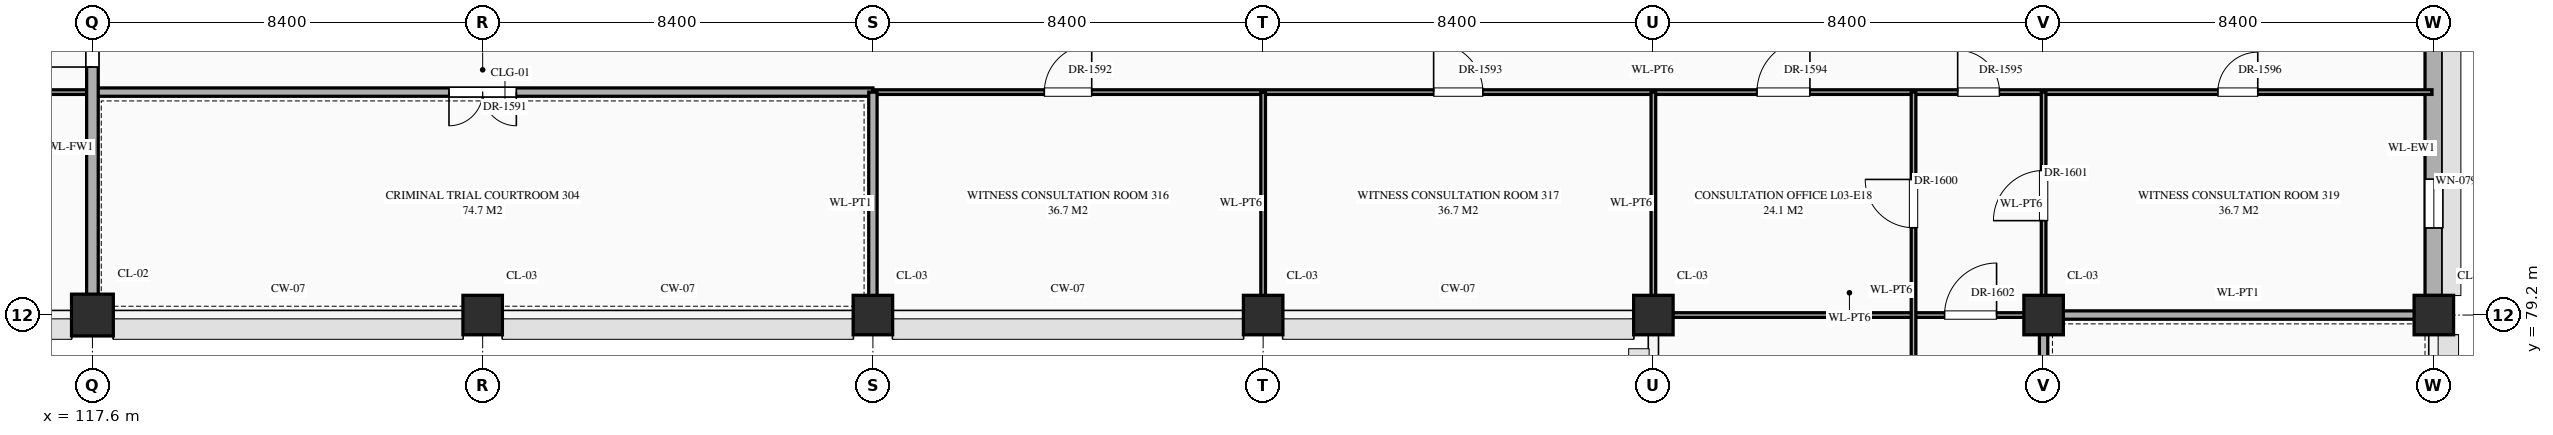
"""IFC4 building model, lengths in metres.
Left out: names, types, materials, properties, quantities, classifications, styles, units other than length and angle.
Written with IfcOpenShell. Run it as: python <this file> out.ifc"""

import sys

from ifc_helpers import new_model, si_unit, direction, frame, frame_2d, origin, origin_2d, place, context, subcontext, project, spatial, rectangle, extrude, element, fill, save


model = new_model("IFC4")
c1 = context("Model", 3, precision=1e-05, world=origin(), true_north=direction((0.0, 1.0)))
c2 = subcontext(c1, "Body", "Model", "MODEL_VIEW")
j1 = project(units=[si_unit("LENGTHUNIT", "METRE"), si_unit("PLANEANGLEUNIT", "RADIAN")], contexts=[c1])
p1 = place(None, origin())
s1 = spatial("IfcSite", under=j1, at=p1, CompositionType="ELEMENT")
p2 = place(p1, origin())
s2 = spatial("IfcBuilding", under=s1, at=p2, CompositionType="ELEMENT")
p3 = place(p2, frame((0.0, 0.0, 10.8)))
s3 = spatial("IfcBuildingStorey", under=s2, at=p3, CompositionType="ELEMENT", Elevation=10.8)
p4 = place(p3, frame((117.6, 79.2, 0.0), z_axis=(0.0, 0.0, 1.0), x_axis=(1.0, 0.0, 0.0)))
e1 = element("IfcColumn", 1, at=p4, inside=s3, PredefinedType="COLUMN", context=c2, shape_type="SweptSolid", body=[
    extrude(rectangle(XDim=0.9, YDim=0.9, at=origin_2d()), origin(), (0.0, 0.0, 1.0), 5.4),
])
for number, where, z_axis, x_axis in (
    (2, (126.0, 79.2, 0.0), (0.0, 0.0, 1.0), (1.0, 0.0, 0.0)),
    (3, (134.4, 79.2, 0.0), (0.0, 0.0, 1.0), (1.0, 0.0, 0.0)),
    (4, (142.8, 79.2, 0.0), (0.0, 0.0, 1.0), (1.0, 0.0, 0.0)),
    (5, (151.2, 79.2, 0.0), (0.0, 0.0, 1.0), (1.0, 0.0, 0.0)),
    (6, (159.6, 79.2, 0.0), (0.0, 0.0, 1.0), (1.0, 0.0, 0.0)),
    (7, (168.0, 79.2, 0.0), (0.0, 0.0, 1.0), (1.0, 0.0, 0.0)),
):
    element("IfcColumn", number, at=place(p3, frame(where, z_axis=z_axis, x_axis=x_axis)), inside=s3, PredefinedType="COLUMN", context=c2, shape_type="SweptSolid", body=[
        extrude(rectangle(XDim=0.85, YDim=0.85, at=origin_2d()), origin(), (0.0, 0.0, 1.0), 5.4),
    ])
p5 = place(p3, frame((168.0, 79.62, 0.0), z_axis=(0.0, 0.0, 1.0), x_axis=(0.0, 1.0, 0.0)))
e8 = element("IfcWall", 8, at=p5, inside=s3, PredefinedType="STANDARD", context=c2, shape_type="SweptSolid", body=[
    extrude(rectangle(XDim=6.36, YDim=0.38, at=frame_2d((3.18, 0.0))), origin(), (0.0, 0.0, 1.0), 4.47),
])
p6 = place(p5, frame((1.455, 0.0, 0.85)))
e9 = element("IfcOpeningElement", 9, at=p6, cuts=e8, PredefinedType="OPENING", context=c2, shape_type="SweptSolid", body=[
    extrude(rectangle(XDim=1.05, YDim=1.92, at=frame_2d((0.525, 0.96))), frame((0.0, 0.202, 0.0), z_axis=(0.0, -1.0, 0.0), x_axis=(1.0, 0.0, 0.0)), (0.0, 0.0, 1.0), 0.404),
])
p7 = place(p3, frame((151.24, 79.2, 0.0), z_axis=(0.0, 0.0, 1.0), x_axis=(1.0, 0.0, 0.0)))
e10 = element("IfcWall", 10, at=p7, inside=s3, PredefinedType="STANDARD", context=c2, shape_type="SweptSolid", body=[
    extrude(rectangle(XDim=8.36, YDim=0.1, at=frame_2d((4.18, 0.0))), origin(), (0.0, 0.0, 1.0), 4.27),
])
p8 = place(p7, frame((6.228, 0.0, 0.0)))
e11 = element("IfcOpeningElement", 11, at=p8, cuts=e10, PredefinedType="OPENING", context=c2, shape_type="SweptSolid", body=[
    extrude(rectangle(XDim=1.12, YDim=2.25, at=frame_2d((0.56, 1.125))), frame((0.0, 0.062, 0.0), z_axis=(0.0, -1.0, 0.0), x_axis=(1.0, 0.0, 0.0)), (0.0, 0.0, 1.0), 0.124),
])
p9 = place(p3, frame((159.6, 79.2, 0.0), z_axis=(0.0, 0.0, 1.0), x_axis=(1.0, 0.0, 0.0)))
e12 = element("IfcWall", 12, at=p9, inside=s3, PredefinedType="STANDARD", context=c2, shape_type="SweptSolid", body=[
    extrude(rectangle(XDim=8.36, YDim=0.18, at=frame_2d((4.18, 0.0))), origin(), (0.0, 0.0, 1.0), 4.27),
])
p10 = place(p3, frame((50.4, 84.0, 0.0), z_axis=(0.0, 0.0, 1.0), x_axis=(1.0, 0.0, 0.0)))
e13 = element("IfcWall", 13, at=p10, inside=s3, PredefinedType="STANDARD", context=c2, shape_type="SweptSolid", body=[
    extrude(rectangle(XDim=67.2, YDim=0.1, at=frame_2d((33.6, 0.0))), origin(), (0.0, 0.0, 1.0), 5.12),
])
p11 = place(p10, frame((3.7, 0.0, 0.0)))
e14 = element("IfcOpeningElement", 14, at=p11, cuts=e13, PredefinedType="OPENING", context=c2, shape_type="SweptSolid", body=[
    extrude(rectangle(XDim=1.0, YDim=2.25, at=frame_2d((0.5, 1.125))), frame((0.0, 0.062, 0.0), z_axis=(0.0, -1.0, 0.0), x_axis=(1.0, 0.0, 0.0)), (0.0, 0.0, 1.0), 0.124),
])
p12 = place(p10, frame((12.08, 0.0, 0.0)))
e15 = element("IfcOpeningElement", 15, at=p12, cuts=e13, PredefinedType="OPENING", context=c2, shape_type="SweptSolid", body=[
    extrude(rectangle(XDim=1.04, YDim=2.2, at=frame_2d((0.52, 1.1))), frame((0.0, 0.062, 0.0), z_axis=(0.0, -1.0, 0.0), x_axis=(1.0, 0.0, 0.0)), (0.0, 0.0, 1.0), 0.124),
])
p13 = place(p10, frame((20.46, 0.0, 0.0)))
e16 = element("IfcOpeningElement", 16, at=p13, cuts=e13, PredefinedType="OPENING", context=c2, shape_type="SweptSolid", body=[
    extrude(rectangle(XDim=1.08, YDim=2.25, at=frame_2d((0.54, 1.125))), frame((0.0, 0.062, 0.0), z_axis=(0.0, -1.0, 0.0), x_axis=(1.0, 0.0, 0.0)), (0.0, 0.0, 1.0), 0.124),
])
p14 = place(p10, frame((28.84, 0.0, 0.0)))
e17 = element("IfcOpeningElement", 17, at=p14, cuts=e13, PredefinedType="OPENING", context=c2, shape_type="SweptSolid", body=[
    extrude(rectangle(XDim=1.12, YDim=2.25, at=frame_2d((0.56, 1.125))), frame((0.0, 0.062, 0.0), z_axis=(0.0, -1.0, 0.0), x_axis=(1.0, 0.0, 0.0)), (0.0, 0.0, 1.0), 0.124),
])
p15 = place(p10, frame((37.2, 0.0, 0.0)))
e18 = element("IfcOpeningElement", 18, at=p15, cuts=e13, PredefinedType="OPENING", context=c2, shape_type="SweptSolid", body=[
    extrude(rectangle(XDim=1.2, YDim=2.35, at=frame_2d((0.6, 1.175))), frame((0.0, 0.062, 0.0), z_axis=(0.0, -1.0, 0.0), x_axis=(1.0, 0.0, 0.0)), (0.0, 0.0, 1.0), 0.124),
])
p16 = place(p10, frame((45.58, 0.0, 0.0)))
e19 = element("IfcOpeningElement", 19, at=p16, cuts=e13, PredefinedType="OPENING", context=c2, shape_type="SweptSolid", body=[
    extrude(rectangle(XDim=1.24, YDim=2.3, at=frame_2d((0.62, 1.15))), frame((0.0, 0.062, 0.0), z_axis=(0.0, -1.0, 0.0), x_axis=(1.0, 0.0, 0.0)), (0.0, 0.0, 1.0), 0.124),
])
p17 = place(p10, frame((53.96, 0.0, 0.0)))
e20 = element("IfcOpeningElement", 20, at=p17, cuts=e13, PredefinedType="OPENING", context=c2, shape_type="SweptSolid", body=[
    extrude(rectangle(XDim=1.28, YDim=2.35, at=frame_2d((0.64, 1.175))), frame((0.0, 0.062, 0.0), z_axis=(0.0, -1.0, 0.0), x_axis=(1.0, 0.0, 0.0)), (0.0, 0.0, 1.0), 0.124),
])
p18 = place(p10, frame((62.53, 0.0, 0.0)))
e21 = element("IfcOpeningElement", 21, at=p18, cuts=e13, PredefinedType="OPENING", context=c2, shape_type="SweptSolid", body=[
    extrude(rectangle(XDim=0.94, YDim=2.3, at=frame_2d((0.47, 1.15))), frame((0.0, 0.062, 0.0), z_axis=(0.0, -1.0, 0.0), x_axis=(1.0, 0.0, 0.0)), (0.0, 0.0, 1.0), 0.124),
])
p19 = place(p3, frame((117.6, 84.0, 0.0), z_axis=(0.0, 0.0, 1.0), x_axis=(1.0, 0.0, 0.0)))
e22 = element("IfcWall", 22, at=p19, inside=s3, PredefinedType="STANDARD", context=c2, shape_type="SweptSolid", body=[
    extrude(rectangle(XDim=16.8, YDim=0.18, at=frame_2d((8.4, 0.0))), origin(), (0.0, 0.0, 1.0), 5.12),
])
p20 = place(p19, frame((7.675, 0.0, 0.0)))
e23 = element("IfcOpeningElement", 23, at=p20, cuts=e22, PredefinedType="OPENING", context=c2, shape_type="SweptSolid", body=[
    extrude(rectangle(XDim=1.45, YDim=2.3, at=frame_2d((0.725, 1.15))), frame((0.0, 0.102, 0.0), z_axis=(0.0, -1.0, 0.0), x_axis=(1.0, 0.0, 0.0)), (0.0, 0.0, 1.0), 0.204),
])
p21 = place(p3, frame((134.4, 84.0, 0.0), z_axis=(0.0, 0.0, 1.0), x_axis=(1.0, 0.0, 0.0)))
e24 = element("IfcWall", 24, at=p21, inside=s3, PredefinedType="STANDARD", context=c2, shape_type="SweptSolid", body=[
    extrude(rectangle(XDim=33.56, YDim=0.1, at=frame_2d((16.78, 0.0))), origin(), (0.0, 0.0, 1.0), 5.12),
])
p22 = place(p21, frame((3.69, 0.0, 0.0)))
e25 = element("IfcOpeningElement", 25, at=p22, cuts=e24, PredefinedType="OPENING", context=c2, shape_type="SweptSolid", body=[
    extrude(rectangle(XDim=1.02, YDim=2.4, at=frame_2d((0.51, 1.2))), frame((0.0, 0.062, 0.0), z_axis=(0.0, -1.0, 0.0), x_axis=(1.0, 0.0, 0.0)), (0.0, 0.0, 1.0), 0.124),
])
p23 = place(p21, frame((12.07, 0.0, 0.0)))
e26 = element("IfcOpeningElement", 26, at=p23, cuts=e24, PredefinedType="OPENING", context=c2, shape_type="SweptSolid", body=[
    extrude(rectangle(XDim=1.06, YDim=2.4, at=frame_2d((0.53, 1.2))), frame((0.0, 0.062, 0.0), z_axis=(0.0, -1.0, 0.0), x_axis=(1.0, 0.0, 0.0)), (0.0, 0.0, 1.0), 0.124),
])
p24 = place(p21, frame((19.03, 0.0, 0.0)))
e27 = element("IfcOpeningElement", 27, at=p24, cuts=e24, PredefinedType="OPENING", context=c2, shape_type="SweptSolid", body=[
    extrude(rectangle(XDim=1.14, YDim=2.4, at=frame_2d((0.57, 1.2))), frame((0.0, 0.062, 0.0), z_axis=(0.0, -1.0, 0.0), x_axis=(1.0, 0.0, 0.0)), (0.0, 0.0, 1.0), 0.124),
])
p25 = place(p21, frame((23.35, 0.0, 0.0)))
e28 = element("IfcOpeningElement", 28, at=p25, cuts=e24, PredefinedType="OPENING", context=c2, shape_type="SweptSolid", body=[
    extrude(rectangle(XDim=0.9, YDim=2.15, at=frame_2d((0.45, 1.075))), frame((0.0, 0.062, 0.0), z_axis=(0.0, -1.0, 0.0), x_axis=(1.0, 0.0, 0.0)), (0.0, 0.0, 1.0), 0.124),
])
p26 = place(p21, frame((28.95, 0.0, 0.0)))
e29 = element("IfcOpeningElement", 29, at=p26, cuts=e24, PredefinedType="OPENING", context=c2, shape_type="SweptSolid", body=[
    extrude(rectangle(XDim=0.86, YDim=2.1, at=frame_2d((0.43, 1.05))), frame((0.0, 0.062, 0.0), z_axis=(0.0, -1.0, 0.0), x_axis=(1.0, 0.0, 0.0)), (0.0, 0.0, 1.0), 0.124),
])
p27 = place(p3, frame((117.6, 79.24, 0.0), z_axis=(0.0, 0.0, 1.0), x_axis=(0.0, 1.0, 0.0)))
e30 = element("IfcWall", 30, at=p27, inside=s3, PredefinedType="STANDARD", context=c2, shape_type="SweptSolid", body=[
    extrude(rectangle(XDim=7.16, YDim=0.25, at=frame_2d((3.58, 0.0))), origin(), (0.0, 0.0, 1.0), 4.37),
])
p28 = place(p27, frame((5.3, 0.0, 0.0)))
e31 = element("IfcOpeningElement", 31, at=p28, cuts=e30, PredefinedType="OPENING", context=c2, shape_type="SweptSolid", body=[
    extrude(rectangle(XDim=0.95, YDim=2.15, at=frame_2d((0.475, 1.075))), frame((0.0, 0.137, 0.0), z_axis=(0.0, -1.0, 0.0), x_axis=(1.0, 0.0, 0.0)), (0.0, 0.0, 1.0), 0.274),
])
p29 = place(p3, frame((134.4, 79.24, 0.0), z_axis=(0.0, 0.0, 1.0), x_axis=(0.0, 1.0, 0.0)))
e32 = element("IfcWall", 32, at=p29, inside=s3, PredefinedType="STANDARD", context=c2, shape_type="SweptSolid", body=[
    extrude(rectangle(XDim=4.76, YDim=0.18, at=frame_2d((2.38, 0.0))), origin(), (0.0, 0.0, 1.0), 4.37),
])
for number, where, z_axis, x_axis in (
    (33, (142.8, 79.24, 0.0), (0.0, 0.0, 1.0), (0.0, 1.0, 0.0)),
    (34, (151.2, 79.24, 0.0), (0.0, 0.0, 1.0), (0.0, 1.0, 0.0)),
):
    element("IfcWall", number, at=place(p3, frame(where, z_axis=z_axis, x_axis=x_axis)), inside=s3, PredefinedType="STANDARD", context=c2, shape_type="SweptSolid", body=[
        extrude(rectangle(XDim=4.76, YDim=0.1, at=frame_2d((2.38, 0.0))), origin(), (0.0, 0.0, 1.0), 4.37),
    ])
p30 = place(p3, frame((156.8, 64.8, 0.0), z_axis=(0.0, 0.0, 1.0), x_axis=(0.0, 1.0, 0.0)))
e35 = element("IfcWall", 35, at=p30, inside=s3, PredefinedType="STANDARD", context=c2, shape_type="SweptSolid", body=[
    extrude(rectangle(XDim=19.2, YDim=0.1, at=frame_2d((9.6, 0.0))), origin(), (0.0, 0.0, 1.0), 5.12),
])
p31 = place(p30, frame((16.28, 0.0, 0.0)))
e36 = element("IfcOpeningElement", 36, at=p31, cuts=e35, PredefinedType="OPENING", context=c2, shape_type="SweptSolid", body=[
    extrude(rectangle(XDim=1.04, YDim=2.2, at=frame_2d((0.52, 1.1))), frame((0.0, 0.062, 0.0), z_axis=(0.0, -1.0, 0.0), x_axis=(1.0, 0.0, 0.0)), (0.0, 0.0, 1.0), 0.124),
])
p32 = place(p30, frame((0.68, 0.0, 0.0)))
e37 = element("IfcOpeningElement", 37, at=p32, cuts=e35, PredefinedType="OPENING", context=c2, shape_type="SweptSolid", body=[
    extrude(rectangle(XDim=1.04, YDim=2.2, at=frame_2d((0.52, 1.1))), frame((0.0, 0.062, 0.0), z_axis=(0.0, -1.0, 0.0), x_axis=(1.0, 0.0, 0.0)), (0.0, 0.0, 1.0), 0.124),
])
p33 = place(p30, frame((4.26, 0.0, 0.0)))
e38 = element("IfcOpeningElement", 38, at=p33, cuts=e35, PredefinedType="OPENING", context=c2, shape_type="SweptSolid", body=[
    extrude(rectangle(XDim=1.08, YDim=2.25, at=frame_2d((0.54, 1.125))), frame((0.0, 0.062, 0.0), z_axis=(0.0, -1.0, 0.0), x_axis=(1.0, 0.0, 0.0)), (0.0, 0.0, 1.0), 0.124),
])
p34 = place(p30, frame((10.24, 0.0, 0.0)))
e39 = element("IfcOpeningElement", 39, at=p34, cuts=e35, PredefinedType="OPENING", context=c2, shape_type="SweptSolid", body=[
    extrude(rectangle(XDim=1.12, YDim=2.25, at=frame_2d((0.56, 1.125))), frame((0.0, 0.062, 0.0), z_axis=(0.0, -1.0, 0.0), x_axis=(1.0, 0.0, 0.0)), (0.0, 0.0, 1.0), 0.124),
])
p35 = place(p3, frame((159.6, 64.8, 0.0), z_axis=(0.0, 0.0, 1.0), x_axis=(0.0, 1.0, 0.0)))
e40 = element("IfcWall", 40, at=p35, inside=s3, PredefinedType="STANDARD", context=c2, shape_type="SweptSolid", body=[
    extrude(rectangle(XDim=14.4, YDim=0.18, at=frame_2d((7.2, 0.0))), origin(), (0.0, 0.0, 1.0), 5.12),
])
p36 = place(p35, frame((6.177, 0.0, 0.0)))
e41 = element("IfcOpeningElement", 41, at=p36, cuts=e40, PredefinedType="OPENING", context=c2, shape_type="SweptSolid", body=[
    extrude(rectangle(XDim=1.7, YDim=2.45, at=frame_2d((0.85, 1.225))), frame((0.0, 0.102, 0.0), z_axis=(0.0, -1.0, 0.0), x_axis=(1.0, 0.0, 0.0)), (0.0, 0.0, 1.0), 0.204),
])
p37 = place(p3, frame((159.6, 79.2, 0.0), z_axis=(0.0, 0.0, 1.0), x_axis=(0.0, 1.0, 0.0)))
e42 = element("IfcWall", 42, at=p37, inside=s3, PredefinedType="STANDARD", context=c2, shape_type="SweptSolid", body=[
    extrude(rectangle(XDim=4.8, YDim=0.1, at=frame_2d((2.4, 0.0))), origin(), (0.0, 0.0, 1.0), 4.37),
])
p38 = place(p37, frame((2.032, 0.0, 0.0)))
e43 = element("IfcOpeningElement", 43, at=p38, cuts=e42, PredefinedType="OPENING", context=c2, shape_type="SweptSolid", body=[
    extrude(rectangle(XDim=1.08, YDim=2.25, at=frame_2d((0.54, 1.125))), frame((0.0, 0.062, 0.0), z_axis=(0.0, -1.0, 0.0), x_axis=(1.0, 0.0, 0.0)), (0.0, 0.0, 1.0), 0.124),
])
p39 = place(p6, origin())
e44 = element("IfcWindow", 44, at=p39, inside=s3, PartitioningType="SINGLE_PANEL", PredefinedType="WINDOW", context=c2, shape_type="SweptSolid", body=[
    extrude(rectangle(XDim=1.05, YDim=1.92, at=frame_2d((0.525, 0.96))), frame((0.0, 0.03, 0.0), z_axis=(0.0, -1.0, 0.0), x_axis=(1.0, 0.0, 0.0)), (0.0, 0.0, 1.0), 0.06),
])
fill(e9, e44)
p40 = place(p28, origin())
e45 = element("IfcDoor", 45, at=p40, inside=s3, OperationType="SINGLE_SWING_LEFT", PredefinedType="DOOR", context=c2, shape_type="SweptSolid", body=[
    extrude(rectangle(XDim=0.95, YDim=2.15, at=frame_2d((0.475, 1.075))), frame((0.0, 0.025, 0.0), z_axis=(0.0, -1.0, 0.0), x_axis=(1.0, 0.0, 0.0)), (0.0, 0.0, 1.0), 0.05),
])
fill(e31, e45)
p41 = place(p20, frame((1.45, 0.0, 0.0), z_axis=(0.0, 0.0, 1.0), x_axis=(-1.0, 0.0, 0.0)))
e46 = element("IfcDoor", 46, at=p41, inside=s3, OperationType="DOUBLE_DOOR_SINGLE_SWING", PredefinedType="DOOR", context=c2, shape_type="SweptSolid", body=[
    extrude(rectangle(XDim=1.45, YDim=2.3, at=frame_2d((0.725, 1.15))), frame((0.0, 0.025, 0.0), z_axis=(0.0, -1.0, 0.0), x_axis=(1.0, 0.0, 0.0)), (0.0, 0.0, 1.0), 0.05),
])
fill(e23, e46)
p42 = place(p22, origin())
e47 = element("IfcDoor", 47, at=p42, inside=s3, OperationType="SINGLE_SWING_RIGHT", PredefinedType="DOOR", context=c2, shape_type="SweptSolid", body=[
    extrude(rectangle(XDim=1.02, YDim=2.4, at=frame_2d((0.51, 1.2))), frame((0.0, 0.025, 0.0), z_axis=(0.0, -1.0, 0.0), x_axis=(1.0, 0.0, 0.0)), (0.0, 0.0, 1.0), 0.05),
])
fill(e25, e47)
p43 = place(p23, origin())
e48 = element("IfcDoor", 48, at=p43, inside=s3, OperationType="SINGLE_SWING_LEFT", PredefinedType="DOOR", context=c2, shape_type="SweptSolid", body=[
    extrude(rectangle(XDim=1.06, YDim=2.4, at=frame_2d((0.53, 1.2))), frame((0.0, 0.025, 0.0), z_axis=(0.0, -1.0, 0.0), x_axis=(1.0, 0.0, 0.0)), (0.0, 0.0, 1.0), 0.05),
])
fill(e26, e48)
p44 = place(p24, origin())
e49 = element("IfcDoor", 49, at=p44, inside=s3, OperationType="SINGLE_SWING_RIGHT", PredefinedType="DOOR", context=c2, shape_type="SweptSolid", body=[
    extrude(rectangle(XDim=1.14, YDim=2.4, at=frame_2d((0.57, 1.2))), frame((0.0, 0.025, 0.0), z_axis=(0.0, -1.0, 0.0), x_axis=(1.0, 0.0, 0.0)), (0.0, 0.0, 1.0), 0.05),
])
fill(e27, e49)
p45 = place(p25, origin())
e50 = element("IfcDoor", 50, at=p45, inside=s3, OperationType="SINGLE_SWING_LEFT", PredefinedType="DOOR", context=c2, shape_type="SweptSolid", body=[
    extrude(rectangle(XDim=0.9, YDim=2.15, at=frame_2d((0.45, 1.075))), frame((0.0, 0.025, 0.0), z_axis=(0.0, -1.0, 0.0), x_axis=(1.0, 0.0, 0.0)), (0.0, 0.0, 1.0), 0.05),
])
fill(e28, e50)
p46 = place(p26, origin())
e51 = element("IfcDoor", 51, at=p46, inside=s3, OperationType="SINGLE_SWING_RIGHT", PredefinedType="DOOR", context=c2, shape_type="SweptSolid", body=[
    extrude(rectangle(XDim=0.86, YDim=2.1, at=frame_2d((0.43, 1.05))), frame((0.0, 0.025, 0.0), z_axis=(0.0, -1.0, 0.0), x_axis=(1.0, 0.0, 0.0)), (0.0, 0.0, 1.0), 0.05),
])
fill(e29, e51)
p47 = place(p31, origin())
e52 = element("IfcDoor", 52, at=p47, inside=s3, OperationType="SINGLE_SWING_RIGHT", PredefinedType="DOOR", context=c2, shape_type="SweptSolid", body=[
    extrude(rectangle(XDim=1.04, YDim=2.2, at=frame_2d((0.52, 1.1))), frame((0.0, 0.025, 0.0), z_axis=(0.0, -1.0, 0.0), x_axis=(1.0, 0.0, 0.0)), (0.0, 0.0, 1.0), 0.05),
])
fill(e36, e52)
p48 = place(p38, origin())
e53 = element("IfcDoor", 53, at=p48, inside=s3, OperationType="SINGLE_SWING_LEFT", PredefinedType="DOOR", context=c2, shape_type="SweptSolid", body=[
    extrude(rectangle(XDim=1.08, YDim=2.25, at=frame_2d((0.54, 1.125))), frame((0.0, 0.025, 0.0), z_axis=(0.0, -1.0, 0.0), x_axis=(1.0, 0.0, 0.0)), (0.0, 0.0, 1.0), 0.05),
])
fill(e43, e53)
p49 = place(p8, origin())
e54 = element("IfcDoor", 54, at=p49, inside=s3, OperationType="SINGLE_SWING_RIGHT", PredefinedType="DOOR", context=c2, shape_type="SweptSolid", body=[
    extrude(rectangle(XDim=1.12, YDim=2.25, at=frame_2d((0.56, 1.125))), frame((0.0, 0.025, 0.0), z_axis=(0.0, -1.0, 0.0), x_axis=(1.0, 0.0, 0.0)), (0.0, 0.0, 1.0), 0.05),
])
fill(e11, e54)
save(model, sys.argv[1])
